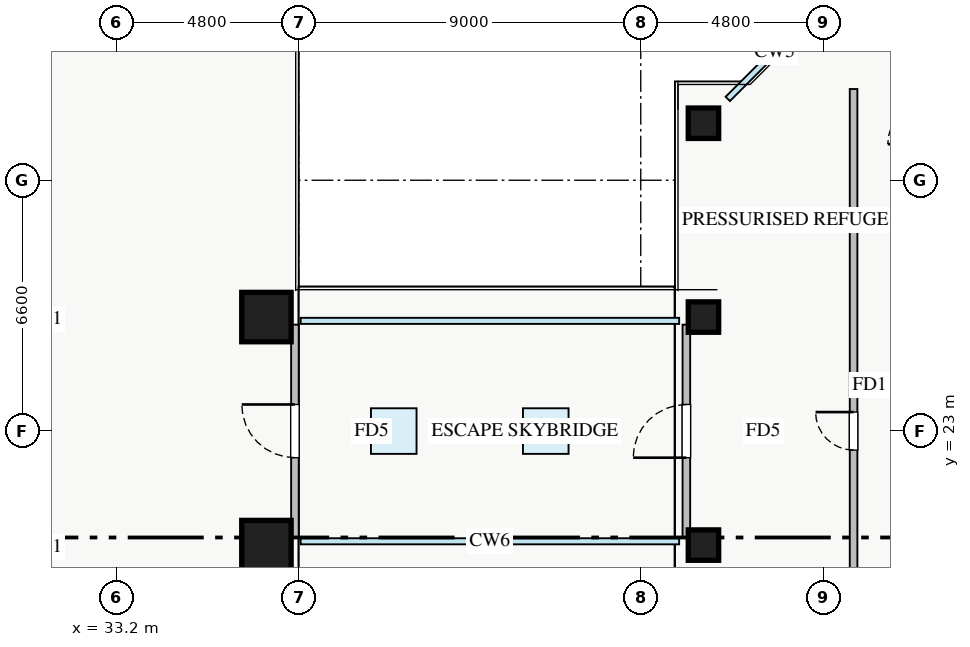
"""IFC4 building model, lengths in metres.
Left out: names, types, materials, properties, quantities, classifications, styles, units other than length and angle.
Written with IfcOpenShell. Run it as: python <this file> out.ifc"""

import sys

from ifc_helpers import new_model, si_unit, direction, frame, frame_2d, origin, origin_2d, place, context, subcontext, project, spatial, rectangle, extrude, source, transform, mapped, element, fill, save


model = new_model("IFC4")
c1 = context("Model", 3, precision=1e-05, world=origin(), true_north=direction((0.0, 1.0)))
c2 = subcontext(c1, "Body", "Model", "MODEL_VIEW")
j1 = project(units=[si_unit("LENGTHUNIT", "METRE"), si_unit("PLANEANGLEUNIT", "RADIAN")], contexts=[c1])
p1 = place(None, origin())
s1 = spatial("IfcSite", under=j1, at=p1, CompositionType="ELEMENT")
p2 = place(p1, origin())
s2 = spatial("IfcBuilding", under=s1, at=p2, CompositionType="ELEMENT")
p3 = place(p2, frame((0.0, 0.0, 92.5)))
s3 = spatial("IfcBuildingStorey", under=s2, at=p3, CompositionType="ELEMENT", Elevation=92.5)
m1 = source(origin(), c2, "Body", "SweptSolid", [
    extrude(rectangle(XDim=1.3, YDim=1.3, at=origin_2d()), origin(), (0.0, 0.0, 1.0), 4.5),
])
for number, where, z_axis, x_axis in (
    (1, (37.15, 20.0, 0.0), (0.0, 0.0, 1.0), (1.0, 0.0, 0.0)),
    (2, (37.15, 26.0, 0.0), (0.0, 0.0, 1.0), (1.0, 0.0, 0.0)),
):
    element("IfcColumn", number, at=place(p3, frame(where, z_axis=z_axis, x_axis=x_axis)), inside=s3, PredefinedType="COLUMN", context=c2, shape_type="MappedRepresentation", body=[
        mapped(m1, transform((0.0, 0.0, 0.0), x_axis=(1.0, 0.0, 0.0), y_axis=(0.0, 1.0, 0.0), z_axis=(0.0, 0.0, 1.0), scale=1.0)),
    ])
m2 = source(origin(), c2, "Body", "SweptSolid", [
    extrude(rectangle(XDim=0.8, YDim=0.8, at=origin_2d()), origin(), (0.0, 0.0, 1.0), 4.5),
])
for number, where, z_axis, x_axis in (
    (3, (48.65, 20.0, 0.0), (0.0, 0.0, 1.0), (1.0, 0.0, 0.0)),
    (4, (48.65, 26.0, 0.0), (0.0, 0.0, 1.0), (1.0, 0.0, 0.0)),
    (5, (48.65, 31.1, 0.0), (0.0, 0.0, 1.0), (1.0, 0.0, 0.0)),
):
    element("IfcColumn", number, at=place(p3, frame(where, z_axis=z_axis, x_axis=x_axis)), inside=s3, PredefinedType="COLUMN", context=c2, shape_type="MappedRepresentation", body=[
        mapped(m2, transform((0.0, 0.0, 0.0), x_axis=(1.0, 0.0, 0.0), y_axis=(0.0, 1.0, 0.0), z_axis=(0.0, 0.0, 1.0), scale=1.0)),
    ])
p4 = place(p3, frame((37.9, 20.2, 0.0), z_axis=(0.0, 0.0, 1.0), x_axis=(0.0, 1.0, 0.0)))
e6 = element("IfcWall", 6, at=p4, inside=s3, PredefinedType="PARTITIONING", context=c2, shape_type="SweptSolid", body=[
    extrude(rectangle(XDim=5.6, YDim=0.2, at=frame_2d((2.8, 0.0))), origin(), (0.0, 0.0, 1.0), 4.32),
])
p5 = place(p4, frame((2.1, 0.0, 0.0)))
e7 = element("IfcOpeningElement", 7, at=p5, cuts=e6, PredefinedType="OPENING", context=c2, shape_type="SweptSolid", body=[
    extrude(rectangle(XDim=1.4, YDim=2.05, at=frame_2d((0.7, 1.025))), frame((0.0, 0.11, 0.0), z_axis=(0.0, -1.0, 0.0), x_axis=(1.0, 0.0, 0.0)), (0.0, 0.0, 1.0), 0.22),
])
p6 = place(p3, frame((48.2, 20.2, 0.0), z_axis=(0.0, 0.0, 1.0), x_axis=(0.0, 1.0, 0.0)))
e8 = element("IfcWall", 8, at=p6, inside=s3, PredefinedType="PARTITIONING", context=c2, shape_type="SweptSolid", body=[
    extrude(rectangle(XDim=5.6, YDim=0.2, at=frame_2d((2.8, 0.0))), origin(), (0.0, 0.0, 1.0), 4.32),
])
p7 = place(p6, frame((2.1, 0.0, 0.0)))
e9 = element("IfcOpeningElement", 9, at=p7, cuts=e8, PredefinedType="OPENING", context=c2, shape_type="SweptSolid", body=[
    extrude(rectangle(XDim=1.4, YDim=2.05, at=frame_2d((0.7, 1.025))), frame((0.0, 0.11, 0.0), z_axis=(0.0, -1.0, 0.0), x_axis=(1.0, 0.0, 0.0)), (0.0, 0.0, 1.0), 0.22),
])
p8 = place(p3, frame((52.6, 14.0, 0.0), z_axis=(0.0, 0.0, 1.0), x_axis=(0.0, 1.0, 0.0)))
e10 = element("IfcWall", 10, at=p8, inside=s3, PredefinedType="PARTITIONING", context=c2, shape_type="SweptSolid", body=[
    extrude(rectangle(XDim=18.0, YDim=0.2, at=frame_2d((9.0, 0.0))), origin(), (0.0, 0.0, 1.0), 3.865),
])
p9 = place(p8, frame((8.5, 0.0, 0.0)))
e11 = element("IfcOpeningElement", 11, at=p9, cuts=e10, PredefinedType="OPENING", context=c2, shape_type="SweptSolid", body=[
    extrude(rectangle(XDim=1.0, YDim=2.05, at=frame_2d((0.5, 1.025))), frame((0.0, 0.11, 0.0), z_axis=(0.0, -1.0, 0.0), x_axis=(1.0, 0.0, 0.0)), (0.0, 0.0, 1.0), 0.22),
])
p10 = place(p3, frame((0.0, 0.0, 4.28)))
p11 = place(p10, frame((40.5, 23.0, 0.0)))
p12 = place(p11, frame((0.0, 0.0, 0.17)))
e12 = element("IfcWindow", 12, at=p12, inside=s3, PartitioningType="SINGLE_PANEL", PredefinedType="SKYLIGHT", context=c2, shape_type="SweptSolid", body=[
    extrude(rectangle(XDim=1.2, YDim=1.2, at=origin_2d()), origin(), (0.0, 0.0, 1.0), 0.05),
])
p13 = place(p10, frame((44.5, 23.0, 0.0)))
p14 = place(p13, frame((0.0, 0.0, 0.17)))
e13 = element("IfcWindow", 13, at=p14, inside=s3, PartitioningType="SINGLE_PANEL", PredefinedType="SKYLIGHT", context=c2, shape_type="SweptSolid", body=[
    extrude(rectangle(XDim=1.2, YDim=1.2, at=origin_2d()), origin(), (0.0, 0.0, 1.0), 0.05),
])
m3 = source(origin(), c2, "Body", "SweptSolid", [
    extrude(rectangle(XDim=1.4, YDim=2.05, at=frame_2d((0.7, 1.025))), frame((0.0, 0.025, 0.0), z_axis=(0.0, -1.0, 0.0), x_axis=(1.0, 0.0, 0.0)), (0.0, 0.0, 1.0), 0.05),
])
p15 = place(p5, origin())
e14 = element("IfcDoor", 14, at=p15, inside=s3, OperationType="SINGLE_SWING_RIGHT", PredefinedType="DOOR", context=c2, shape_type="MappedRepresentation", body=[
    mapped(m3, transform((0.0, 0.0, 0.0), x_axis=(1.0, 0.0, 0.0), y_axis=(0.0, 1.0, 0.0), z_axis=(0.0, 0.0, 1.0), scale=1.0)),
])
fill(e7, e14)
p16 = place(p7, origin())
e15 = element("IfcDoor", 15, at=p16, inside=s3, OperationType="SINGLE_SWING_LEFT", PredefinedType="DOOR", context=c2, shape_type="MappedRepresentation", body=[
    mapped(m3, transform((0.0, 0.0, 0.0), x_axis=(1.0, 0.0, 0.0), y_axis=(0.0, 1.0, 0.0), z_axis=(0.0, 0.0, 1.0), scale=1.0)),
])
fill(e9, e15)
m4 = source(origin(), c2, "Body", "SweptSolid", [
    extrude(rectangle(XDim=1.0, YDim=2.05, at=frame_2d((0.5, 1.025))), frame((0.0, 0.025, 0.0), z_axis=(0.0, -1.0, 0.0), x_axis=(1.0, 0.0, 0.0)), (0.0, 0.0, 1.0), 0.05),
])
p17 = place(p9, origin())
e16 = element("IfcDoor", 16, at=p17, inside=s3, OperationType="SINGLE_SWING_RIGHT", PredefinedType="DOOR", context=c2, shape_type="MappedRepresentation", body=[
    mapped(m4, transform((0.0, 0.0, 0.0), x_axis=(1.0, 0.0, 0.0), y_axis=(0.0, 1.0, 0.0), z_axis=(0.0, 0.0, 1.0), scale=1.0)),
])
fill(e11, e16)
save(model, sys.argv[1])
